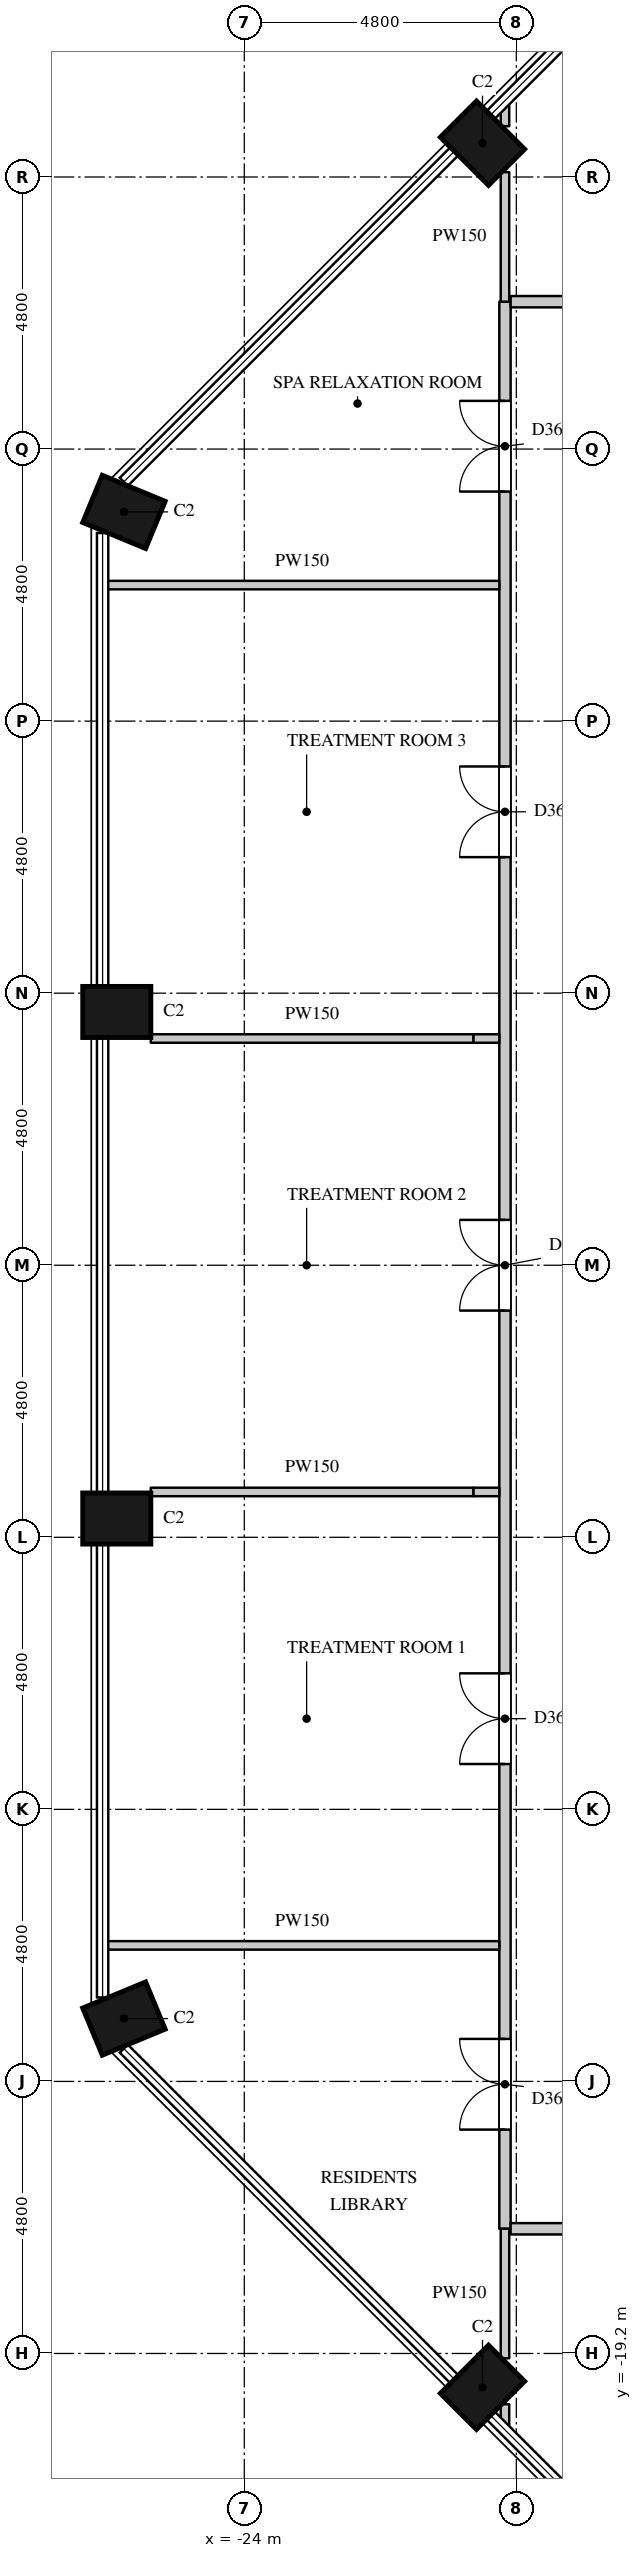
"""IFC4 building model, lengths in metres.
Left out: names, types, materials, properties, quantities, classifications, styles, units other than length and angle.
Written with IfcOpenShell. Run it as: python <this file> out.ifc"""

import sys

from ifc_helpers import new_model, si_unit, direction, frame, frame_2d, origin, origin_2d, place, context, subcontext, project, spatial, rectangle, extrude, element, fill, save


model = new_model("IFC4")
c1 = context("Model", 3, precision=1e-05, world=origin(), true_north=direction((0.0, 1.0)))
c2 = subcontext(c1, "Body", "Model", "MODEL_VIEW")
j1 = project(units=[si_unit("LENGTHUNIT", "METRE"), si_unit("PLANEANGLEUNIT", "RADIAN")], contexts=[c1])
p1 = place(None, origin())
s1 = spatial("IfcSite", under=j1, at=p1, CompositionType="ELEMENT")
p2 = place(p1, origin())
s2 = spatial("IfcBuilding", under=s1, at=p2, CompositionType="ELEMENT")
p3 = place(p2, frame((0.0, 0.0, 156.9)))
s3 = spatial("IfcBuildingStorey", under=s2, at=p3, CompositionType="ELEMENT", Elevation=156.9)
for number, where, z_axis, x_axis in (
    (1, (-19.797, 19.797, 0.0), (0.0, 0.0, 1.0), (-0.707, -0.707, 0.0)),
    (2, (-26.124, 13.291, 0.0), (0.0, 0.0, 1.0), (-0.383, -0.924, 0.0)),
    (3, (-26.25, 4.469, 0.0), (0.0, 0.0, 1.0), (0.0, -1.0, 0.0)),
    (4, (-26.25, -4.469, 0.0), (0.0, 0.0, 1.0), (0.0, -1.0, 0.0)),
    (5, (-26.124, -13.291, 0.0), (0.0, 0.0, 1.0), (0.383, -0.924, 0.0)),
    (6, (-19.797, -19.797, 0.0), (0.0, 0.0, 1.0), (0.707, -0.707, 0.0)),
):
    element("IfcColumn", number, at=place(p3, frame(where, z_axis=z_axis, x_axis=x_axis)), inside=s3, PredefinedType="COLUMN", context=c2, shape_type="SweptSolid", body=[
        extrude(rectangle(XDim=0.9, YDim=1.2, at=origin_2d()), origin(), (0.0, 0.0, 1.0), 5.4),
    ])
p4 = place(p3, frame((-19.4, -17.0, 0.0), z_axis=(0.0, 0.0, 1.0), x_axis=(0.0, 1.0, 0.0)))
e7 = element("IfcWall", 7, at=p4, inside=s3, PredefinedType="PARTITIONING", context=c2, shape_type="SweptSolid", body=[
    extrude(rectangle(XDim=34.0, YDim=0.2, at=frame_2d((17.0, 0.0))), origin(), (0.0, 0.0, 1.0), 5.1),
])
p5 = place(p4, frame((1.75, 0.0, 0.0)))
e8 = element("IfcOpeningElement", 8, at=p5, cuts=e7, PredefinedType="OPENING", context=c2, shape_type="SweptSolid", body=[
    extrude(rectangle(XDim=1.6, YDim=2.4, at=frame_2d((0.8, 1.2))), frame((0.0, 0.11, 0.0), z_axis=(0.0, -1.0, 0.0), x_axis=(1.0, 0.0, 0.0)), (0.0, 0.0, 1.0), 0.22),
])
p6 = place(p4, frame((8.2, 0.0, 0.0)))
e9 = element("IfcOpeningElement", 9, at=p6, cuts=e7, PredefinedType="OPENING", context=c2, shape_type="SweptSolid", body=[
    extrude(rectangle(XDim=1.6, YDim=2.4, at=frame_2d((0.8, 1.2))), frame((0.0, 0.11, 0.0), z_axis=(0.0, -1.0, 0.0), x_axis=(1.0, 0.0, 0.0)), (0.0, 0.0, 1.0), 0.22),
])
p7 = place(p4, frame((16.2, 0.0, 0.0)))
e10 = element("IfcOpeningElement", 10, at=p7, cuts=e7, PredefinedType="OPENING", context=c2, shape_type="SweptSolid", body=[
    extrude(rectangle(XDim=1.6, YDim=2.4, at=frame_2d((0.8, 1.2))), frame((0.0, 0.11, 0.0), z_axis=(0.0, -1.0, 0.0), x_axis=(1.0, 0.0, 0.0)), (0.0, 0.0, 1.0), 0.22),
])
p8 = place(p4, frame((24.2, 0.0, 0.0)))
e11 = element("IfcOpeningElement", 11, at=p8, cuts=e7, PredefinedType="OPENING", context=c2, shape_type="SweptSolid", body=[
    extrude(rectangle(XDim=1.6, YDim=2.4, at=frame_2d((0.8, 1.2))), frame((0.0, 0.11, 0.0), z_axis=(0.0, -1.0, 0.0), x_axis=(1.0, 0.0, 0.0)), (0.0, 0.0, 1.0), 0.22),
])
p9 = place(p4, frame((30.65, 0.0, 0.0)))
e12 = element("IfcOpeningElement", 12, at=p9, cuts=e7, PredefinedType="OPENING", context=c2, shape_type="SweptSolid", body=[
    extrude(rectangle(XDim=1.6, YDim=2.4, at=frame_2d((0.8, 1.2))), frame((0.0, 0.11, 0.0), z_axis=(0.0, -1.0, 0.0), x_axis=(1.0, 0.0, 0.0)), (0.0, 0.0, 1.0), 0.22),
])
p10 = place(p3, frame((-19.3, -17.0, 0.0), z_axis=(0.0, 0.0, 1.0), x_axis=(1.0, 0.0, 0.0)))
e13 = element("IfcWall", 13, at=p10, inside=s3, PredefinedType="PARTITIONING", context=c2, shape_type="SweptSolid", body=[
    extrude(rectangle(XDim=38.6, YDim=0.2, at=frame_2d((19.3, 0.0))), origin(), (0.0, 0.0, 1.0), 5.1),
])
p11 = place(p10, frame((3.25, 0.0, 0.0)))
e14 = element("IfcOpeningElement", 14, at=p11, cuts=e13, PredefinedType="OPENING", context=c2, shape_type="SweptSolid", body=[
    extrude(rectangle(XDim=0.9, YDim=2.2, at=frame_2d((0.45, 1.1))), frame((0.0, 0.11, 0.0), z_axis=(0.0, -1.0, 0.0), x_axis=(1.0, 0.0, 0.0)), (0.0, 0.0, 1.0), 0.22),
])
p12 = place(p10, frame((9.8, 0.0, 0.0)))
e15 = element("IfcOpeningElement", 15, at=p12, cuts=e13, PredefinedType="OPENING", context=c2, shape_type="SweptSolid", body=[
    extrude(rectangle(XDim=0.9, YDim=2.2, at=frame_2d((0.45, 1.1))), frame((0.0, 0.11, 0.0), z_axis=(0.0, -1.0, 0.0), x_axis=(1.0, 0.0, 0.0)), (0.0, 0.0, 1.0), 0.22),
])
p13 = place(p10, frame((14.2, 0.0, 0.0)))
e16 = element("IfcOpeningElement", 16, at=p13, cuts=e13, PredefinedType="OPENING", context=c2, shape_type="SweptSolid", body=[
    extrude(rectangle(XDim=0.9, YDim=2.2, at=frame_2d((0.45, 1.1))), frame((0.0, 0.11, 0.0), z_axis=(0.0, -1.0, 0.0), x_axis=(1.0, 0.0, 0.0)), (0.0, 0.0, 1.0), 0.22),
])
p14 = place(p10, frame((18.9, 0.0, 0.0)))
e17 = element("IfcOpeningElement", 17, at=p14, cuts=e13, PredefinedType="OPENING", context=c2, shape_type="SweptSolid", body=[
    extrude(rectangle(XDim=1.6, YDim=2.4, at=frame_2d((0.8, 1.2))), frame((0.0, 0.11, 0.0), z_axis=(0.0, -1.0, 0.0), x_axis=(1.0, 0.0, 0.0)), (0.0, 0.0, 1.0), 0.22),
])
p15 = place(p10, frame((26.0, 0.0, 0.0)))
e18 = element("IfcOpeningElement", 18, at=p15, cuts=e13, PredefinedType="OPENING", context=c2, shape_type="SweptSolid", body=[
    extrude(rectangle(XDim=1.6, YDim=2.4, at=frame_2d((0.8, 1.2))), frame((0.0, 0.11, 0.0), z_axis=(0.0, -1.0, 0.0), x_axis=(1.0, 0.0, 0.0)), (0.0, 0.0, 1.0), 0.22),
])
p16 = place(p10, frame((33.6, 0.0, 0.0)))
e19 = element("IfcOpeningElement", 19, at=p16, cuts=e13, PredefinedType="OPENING", context=c2, shape_type="SweptSolid", body=[
    extrude(rectangle(XDim=1.6, YDim=2.4, at=frame_2d((0.8, 1.2))), frame((0.0, 0.11, 0.0), z_axis=(0.0, -1.0, 0.0), x_axis=(1.0, 0.0, 0.0)), (0.0, 0.0, 1.0), 0.22),
])
p17 = place(p10, frame((24.95, 0.0, 0.0)))
e20 = element("IfcOpeningElement", 20, at=p17, cuts=e13, PredefinedType="OPENING", context=c2, shape_type="SweptSolid", body=[
    extrude(rectangle(XDim=0.9, YDim=2.2, at=frame_2d((0.45, 1.1))), frame((0.0, 0.11, 0.0), z_axis=(0.0, -1.0, 0.0), x_axis=(1.0, 0.0, 0.0)), (0.0, 0.0, 1.0), 0.22),
])
p18 = place(p3, frame((-19.3, 17.0, 0.0), z_axis=(0.0, 0.0, 1.0), x_axis=(1.0, 0.0, 0.0)))
e21 = element("IfcWall", 21, at=p18, inside=s3, PredefinedType="PARTITIONING", context=c2, shape_type="SweptSolid", body=[
    extrude(rectangle(XDim=38.625, YDim=0.2, at=frame_2d((19.312, 0.0))), origin(), (0.0, 0.0, 1.0), 5.1),
])
p19 = place(p18, frame((4.9, 0.0, 0.0)))
e22 = element("IfcOpeningElement", 22, at=p19, cuts=e21, PredefinedType="OPENING", context=c2, shape_type="SweptSolid", body=[
    extrude(rectangle(XDim=1.6, YDim=2.4, at=frame_2d((0.8, 1.2))), frame((0.0, 0.11, 0.0), z_axis=(0.0, -1.0, 0.0), x_axis=(1.0, 0.0, 0.0)), (0.0, 0.0, 1.0), 0.22),
])
p20 = place(p18, frame((34.1, 0.0, 0.0)))
e23 = element("IfcOpeningElement", 23, at=p20, cuts=e21, PredefinedType="OPENING", context=c2, shape_type="SweptSolid", body=[
    extrude(rectangle(XDim=1.6, YDim=2.4, at=frame_2d((0.8, 1.2))), frame((0.0, 0.11, 0.0), z_axis=(0.0, -1.0, 0.0), x_axis=(1.0, 0.0, 0.0)), (0.0, 0.0, 1.0), 0.22),
])
p21 = place(p18, frame((20.5, 0.0, 0.0)))
e24 = element("IfcOpeningElement", 24, at=p21, cuts=e21, PredefinedType="OPENING", context=c2, shape_type="SweptSolid", body=[
    extrude(rectangle(XDim=1.6, YDim=2.4, at=frame_2d((0.8, 1.2))), frame((0.0, 0.11, 0.0), z_axis=(0.0, -1.0, 0.0), x_axis=(1.0, 0.0, 0.0)), (0.0, 0.0, 1.0), 0.22),
])
p22 = place(p18, frame((32.35, 0.0, 0.0)))
e25 = element("IfcOpeningElement", 25, at=p22, cuts=e21, PredefinedType="OPENING", context=c2, shape_type="SweptSolid", body=[
    extrude(rectangle(XDim=1.6, YDim=2.4, at=frame_2d((0.8, 1.2))), frame((0.0, 0.11, 0.0), z_axis=(0.0, -1.0, 0.0), x_axis=(1.0, 0.0, 0.0)), (0.0, 0.0, 1.0), 0.22),
])
p23 = place(p3, frame((-26.455, -12.0, 0.0), z_axis=(0.0, 0.0, 1.0), x_axis=(1.0, 0.0, 0.0)))
e26 = element("IfcWall", 26, at=p23, inside=s3, PredefinedType="PARTITIONING", context=c2, shape_type="SweptSolid", body=[
    extrude(rectangle(XDim=6.955, YDim=0.15, at=frame_2d((3.478, 0.0))), origin(), (0.0, 0.0, 1.0), 5.1),
])
p24 = place(p3, frame((-25.65, -4.0, 0.0), z_axis=(0.0, 0.0, 1.0), x_axis=(1.0, 0.0, 0.0)))
e27 = element("IfcWall", 27, at=p24, inside=s3, PredefinedType="PARTITIONING", context=c2, shape_type="SweptSolid", body=[
    extrude(rectangle(XDim=5.695, YDim=0.15, at=frame_2d((2.847, 0.0))), origin(), (0.0, 0.0, 1.0), 3.35),
])
p25 = place(p3, frame((-19.955, -4.0, 0.0), z_axis=(0.0, 0.0, 1.0), x_axis=(1.0, 0.0, 0.0)))
e28 = element("IfcWall", 28, at=p25, inside=s3, PredefinedType="PARTITIONING", context=c2, shape_type="SweptSolid", body=[
    extrude(rectangle(XDim=0.455, YDim=0.15, at=frame_2d((0.228, 0.0))), origin(), (0.0, 0.0, 1.0), 5.1),
])
p26 = place(p3, frame((-25.65, 4.0, 0.0), z_axis=(0.0, 0.0, 1.0), x_axis=(1.0, 0.0, 0.0)))
e29 = element("IfcWall", 29, at=p26, inside=s3, PredefinedType="PARTITIONING", context=c2, shape_type="SweptSolid", body=[
    extrude(rectangle(XDim=5.695, YDim=0.15, at=frame_2d((2.847, 0.0))), origin(), (0.0, 0.0, 1.0), 3.35),
])
p27 = place(p3, frame((-19.955, 4.0, 0.0), z_axis=(0.0, 0.0, 1.0), x_axis=(1.0, 0.0, 0.0)))
e30 = element("IfcWall", 30, at=p27, inside=s3, PredefinedType="PARTITIONING", context=c2, shape_type="SweptSolid", body=[
    extrude(rectangle(XDim=0.455, YDim=0.15, at=frame_2d((0.228, 0.0))), origin(), (0.0, 0.0, 1.0), 5.1),
])
p28 = place(p3, frame((-26.455, 12.0, 0.0), z_axis=(0.0, 0.0, 1.0), x_axis=(1.0, 0.0, 0.0)))
e31 = element("IfcWall", 31, at=p28, inside=s3, PredefinedType="PARTITIONING", context=c2, shape_type="SweptSolid", body=[
    extrude(rectangle(XDim=6.955, YDim=0.15, at=frame_2d((3.478, 0.0))), origin(), (0.0, 0.0, 1.0), 5.1),
])
p29 = place(p3, frame((-19.4, -20.484, 0.0), z_axis=(0.0, 0.0, 1.0), x_axis=(0.0, 1.0, 0.0)))
e32 = element("IfcWall", 32, at=p29, inside=s3, PredefinedType="PARTITIONING", context=c2, shape_type="SweptSolid", body=[
    extrude(rectangle(XDim=0.387, YDim=0.15, at=frame_2d((0.194, 0.0))), origin(), (0.0, 0.0, 1.0), 5.1),
])
for number, where, z_axis, x_axis in (
    (33, (-19.4, -19.285, 0.0), (0.0, 0.0, 1.0), (0.0, 1.0, 0.0)),
    (34, (-19.4, 17.0, 0.0), (0.0, 0.0, 1.0), (0.0, 1.0, 0.0)),
):
    element("IfcWall", number, at=place(p3, frame(where, z_axis=z_axis, x_axis=x_axis)), inside=s3, PredefinedType="PARTITIONING", context=c2, shape_type="SweptSolid", body=[
        extrude(rectangle(XDim=2.285, YDim=0.15, at=frame_2d((1.143, 0.0))), origin(), (0.0, 0.0, 1.0), 5.1),
    ])
p30 = place(p3, frame((-19.4, 20.096, 0.0), z_axis=(0.0, 0.0, 1.0), x_axis=(0.0, 1.0, 0.0)))
e35 = element("IfcWall", 35, at=p30, inside=s3, PredefinedType="PARTITIONING", context=c2, shape_type="SweptSolid", body=[
    extrude(rectangle(XDim=0.387, YDim=0.15, at=frame_2d((0.194, 0.0))), origin(), (0.0, 0.0, 1.0), 5.1),
])
p31 = place(p5, origin())
e36 = element("IfcDoor", 36, at=p31, inside=s3, OperationType="DOUBLE_DOOR_SINGLE_SWING", PredefinedType="DOOR", context=c2, shape_type="SweptSolid", body=[
    extrude(rectangle(XDim=1.6, YDim=2.4, at=frame_2d((0.8, 1.2))), frame((0.0, 0.025, 0.0), z_axis=(0.0, -1.0, 0.0), x_axis=(1.0, 0.0, 0.0)), (0.0, 0.0, 1.0), 0.05),
])
fill(e8, e36)
p32 = place(p6, origin())
e37 = element("IfcDoor", 37, at=p32, inside=s3, OperationType="DOUBLE_DOOR_SINGLE_SWING", PredefinedType="DOOR", context=c2, shape_type="SweptSolid", body=[
    extrude(rectangle(XDim=1.6, YDim=2.4, at=frame_2d((0.8, 1.2))), frame((0.0, 0.025, 0.0), z_axis=(0.0, -1.0, 0.0), x_axis=(1.0, 0.0, 0.0)), (0.0, 0.0, 1.0), 0.05),
])
fill(e9, e37)
p33 = place(p7, origin())
e38 = element("IfcDoor", 38, at=p33, inside=s3, OperationType="DOUBLE_DOOR_SINGLE_SWING", PredefinedType="DOOR", context=c2, shape_type="SweptSolid", body=[
    extrude(rectangle(XDim=1.6, YDim=2.4, at=frame_2d((0.8, 1.2))), frame((0.0, 0.025, 0.0), z_axis=(0.0, -1.0, 0.0), x_axis=(1.0, 0.0, 0.0)), (0.0, 0.0, 1.0), 0.05),
])
fill(e10, e38)
p34 = place(p8, origin())
e39 = element("IfcDoor", 39, at=p34, inside=s3, OperationType="DOUBLE_DOOR_SINGLE_SWING", PredefinedType="DOOR", context=c2, shape_type="SweptSolid", body=[
    extrude(rectangle(XDim=1.6, YDim=2.4, at=frame_2d((0.8, 1.2))), frame((0.0, 0.025, 0.0), z_axis=(0.0, -1.0, 0.0), x_axis=(1.0, 0.0, 0.0)), (0.0, 0.0, 1.0), 0.05),
])
fill(e11, e39)
p35 = place(p9, origin())
e40 = element("IfcDoor", 40, at=p35, inside=s3, OperationType="DOUBLE_DOOR_SINGLE_SWING", PredefinedType="DOOR", context=c2, shape_type="SweptSolid", body=[
    extrude(rectangle(XDim=1.6, YDim=2.4, at=frame_2d((0.8, 1.2))), frame((0.0, 0.025, 0.0), z_axis=(0.0, -1.0, 0.0), x_axis=(1.0, 0.0, 0.0)), (0.0, 0.0, 1.0), 0.05),
])
fill(e12, e40)
save(model, sys.argv[1])
